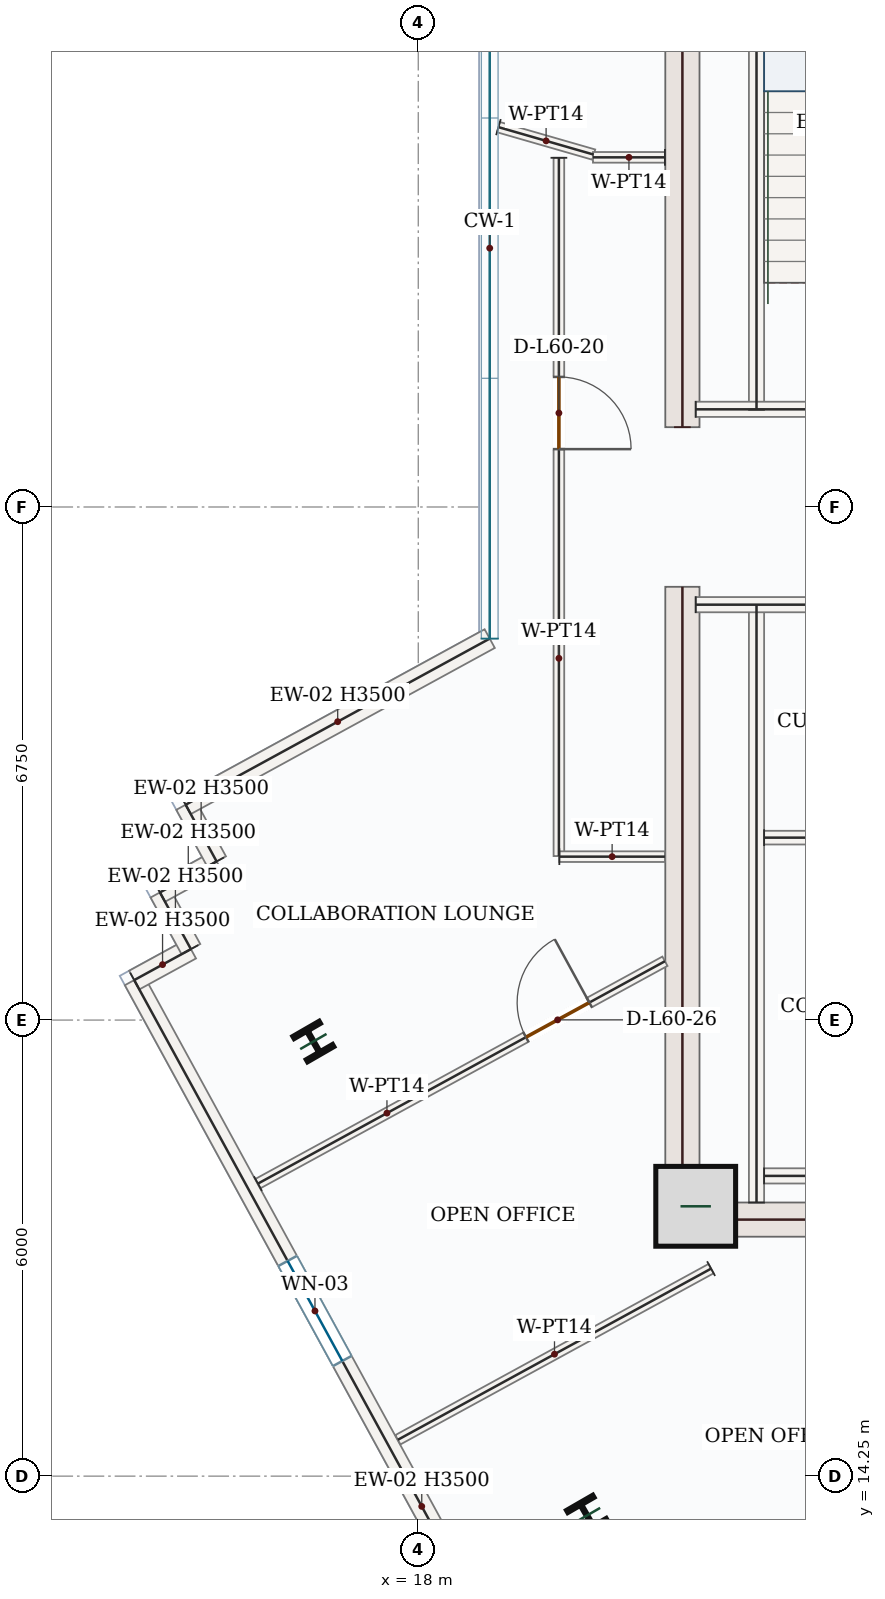
"""IFC4 building model, lengths in metres.
Left out: names, types, materials, properties, quantities, classifications, styles, units other than length and angle.
Written with IfcOpenShell. Run it as: python <this file> out.ifc"""

import sys

from ifc_helpers import new_model, si_unit, direction, frame, frame_2d, origin, origin_2d, place, context, subcontext, project, spatial, rectangle, i_section, extrude, source, transform, mapped, element, fill, save


model = new_model("IFC4")
c1 = context("Model", 3, precision=1e-05, world=origin(), true_north=direction((0.0, 1.0)))
c2 = subcontext(c1, "Body", "Model", "MODEL_VIEW")
j1 = project(units=[si_unit("LENGTHUNIT", "METRE"), si_unit("PLANEANGLEUNIT", "RADIAN")], contexts=[c1])
p1 = place(None, origin())
s1 = spatial("IfcSite", under=j1, at=p1, CompositionType="ELEMENT")
p2 = place(p1, origin())
s2 = spatial("IfcBuilding", under=s1, at=p2, CompositionType="ELEMENT")
p3 = place(p2, frame((0.0, 0.0, 254.1)))
s3 = spatial("IfcBuildingStorey", under=s2, at=p3, CompositionType="ELEMENT", Elevation=254.1)
m1 = source(origin(), c2, "Body", "SweptSolid", [
    extrude(rectangle(XDim=8.55, YDim=0.45, at=frame_2d((4.275, 0.0))), origin(), (0.0, 0.0, 1.0), 3.5),
])
for number, where, z_axis, x_axis in (
    (1, (21.475, 17.4, 0.0), (0.0, 0.0, 1.0), (0.0, 1.0, 0.0)),
    (2, (21.475, 28.05, 0.0), (0.0, 0.0, 1.0), (0.0, 1.0, 0.0)),
):
    element("IfcWall", number, at=place(p3, frame(where, z_axis=z_axis, x_axis=x_axis)), inside=s3, PredefinedType="SHEAR", context=c2, shape_type="MappedRepresentation", body=[
        mapped(m1, transform((0.0, 0.0, 0.0), x_axis=(1.0, 0.0, 0.0), y_axis=(0.0, 1.0, 0.0), z_axis=(0.0, 0.0, 1.0), scale=1.0)),
    ])
m2 = source(origin(), c2, "Body", "SweptSolid", [
    extrude(rectangle(XDim=7.1, YDim=0.45, at=frame_2d((3.55, 0.0))), origin(), (0.0, 0.0, 1.0), 3.5),
])
p4 = place(p3, frame((21.7, 17.625, 0.0), z_axis=(0.0, 0.0, 1.0), x_axis=(1.0, 0.0, 0.0)))
e3 = element("IfcWall", 3, at=p4, inside=s3, PredefinedType="SHEAR", context=c2, shape_type="MappedRepresentation", body=[
    mapped(m2, transform((0.0, 0.0, 0.0), x_axis=(1.0, 0.0, 0.0), y_axis=(0.0, 1.0, 0.0), z_axis=(0.0, 0.0, 1.0), scale=1.0)),
])
m3 = source(origin(), c2, "Body", "SweptSolid", [
    extrude(rectangle(XDim=1.05, YDim=1.05, at=origin_2d()), origin(), (0.0, 0.0, 1.0), 3.75),
])
p5 = place(p3, frame((21.65, 17.8, 0.0), z_axis=(0.0, 0.0, 1.0), x_axis=(1.0, 0.0, 0.0)))
e4 = element("IfcColumn", 4, at=p5, inside=s3, PredefinedType="COLUMN", context=c2, shape_type="MappedRepresentation", body=[
    mapped(m3, transform((0.0, 0.0, 0.0), x_axis=(1.0, 0.0, 0.0), y_axis=(0.0, 1.0, 0.0), z_axis=(0.0, 0.0, 1.0), scale=1.0)),
])
m4 = source(origin(), c2, "Body", "SweptSolid", [
    extrude(i_section(OverallWidth=0.399, OverallDepth=0.386, WebThickness=0.021, FlangeThickness=0.033, FilletRadius=0.018, at=origin_2d()), origin(), (0.0, 0.0, 1.0), 3.75),
])
for number, where, z_axis, x_axis in (
    (5, (16.62, 19.968, 0.0), (0.0, 0.0, 1.0), (0.866, 0.5, 0.0)),
    (6, (20.22, 13.732, 0.0), (0.0, 0.0, 1.0), (0.866, 0.5, 0.0)),
):
    element("IfcColumn", number, at=place(p3, frame(where, z_axis=z_axis, x_axis=x_axis)), inside=s3, PredefinedType="COLUMN", context=c2, shape_type="MappedRepresentation", body=[
        mapped(m4, transform((0.0, 0.0, 0.0), x_axis=(1.0, 0.0, 0.0), y_axis=(0.0, 1.0, 0.0), z_axis=(0.0, 0.0, 1.0), scale=1.0)),
    ])
p6 = place(p3, frame((27.451, 14.74, 0.0), z_axis=(0.0, 0.0, 1.0), x_axis=(-0.877569176667, -0.479450039279, 0.0)))
e7 = element("IfcWall", 7, at=p6, inside=s3, PredefinedType="SOLIDWALL", context=c2, shape_type="SweptSolid", body=[
    extrude(rectangle(XDim=6.979, YDim=0.28, at=frame_2d((3.49, 0.0))), origin(), (0.0, 0.0, 1.0), 3.5),
])
p7 = place(p6, frame((2.74, 0.0, 0.85)))
e8 = element("IfcOpeningElement", 8, at=p7, cuts=e7, PredefinedType="OPENING", context=c2, shape_type="SweptSolid", body=[
    extrude(rectangle(XDim=1.5, YDim=1.5, at=frame_2d((0.75, 0.75))), frame((0.0, 0.15, 0.0), z_axis=(0.0, -1.0, 0.0), x_axis=(1.0, 0.0, 0.0)), (0.0, 0.0, 1.0), 0.3),
])
p8 = place(p3, frame((19.019, 12.071, 0.0), z_axis=(0.0, 0.0, 1.0), x_axis=(-0.479472774144, 0.877556755347, 0.0)))
e9 = element("IfcWall", 9, at=p8, inside=s3, PredefinedType="SOLIDWALL", context=c2, shape_type="SweptSolid", body=[
    extrude(rectangle(XDim=9.92, YDim=0.28, at=frame_2d((4.96, 0.0))), origin(), (0.0, 0.0, 1.0), 3.5),
])
p9 = place(p8, frame((4.21, 0.0, 0.85)))
e10 = element("IfcOpeningElement", 10, at=p9, cuts=e9, PredefinedType="OPENING", context=c2, shape_type="SweptSolid", body=[
    extrude(rectangle(XDim=1.5, YDim=1.5, at=frame_2d((0.75, 0.75))), frame((0.0, 0.15, 0.0), z_axis=(0.0, -1.0, 0.0), x_axis=(1.0, 0.0, 0.0)), (0.0, 0.0, 1.0), 0.3),
])
m5 = source(origin(), c2, "Body", "SweptSolid", [
    extrude(rectangle(XDim=0.85, YDim=0.28, at=frame_2d((0.425, 0.0))), origin(), (0.0, 0.0, 1.0), 3.5),
])
p10 = place(p3, frame((14.263, 20.776, 0.0), z_axis=(0.0, 0.0, 1.0), x_axis=(0.87752219781, 0.479536017782, 0.0)))
e11 = element("IfcWall", 11, at=p10, inside=s3, PredefinedType="SOLIDWALL", context=c2, shape_type="MappedRepresentation", body=[
    mapped(m5, transform((0.0, 0.0, 0.0), x_axis=(1.0, 0.0, 0.0), y_axis=(0.0, 1.0, 0.0), z_axis=(0.0, 0.0, 1.0), scale=1.0)),
])
m6 = source(origin(), c2, "Body", "SweptSolid", [
    extrude(rectangle(XDim=0.85, YDim=0.28, at=frame_2d((0.425, 0.0))), origin(), (0.0, 0.0, 1.0), 3.5),
])
for number, where, z_axis, x_axis in (
    (12, (15.009, 21.184, 0.0), (0.0, 0.0, 1.0), (-0.479, 0.878, 0.0)),
    (13, (14.601, 21.929, 0.0), (0.0, 0.0, 1.0), (0.878, 0.479, 0.0)),
):
    element("IfcWall", number, at=place(p3, frame(where, z_axis=z_axis, x_axis=x_axis)), inside=s3, PredefinedType="SOLIDWALL", context=c2, shape_type="MappedRepresentation", body=[
        mapped(m6, transform((0.0, 0.0, 0.0), x_axis=(1.0, 0.0, 0.0), y_axis=(0.0, 1.0, 0.0), z_axis=(0.0, 0.0, 1.0), scale=1.0)),
    ])
m7 = source(origin(), c2, "Body", "SweptSolid", [
    extrude(rectangle(XDim=0.85, YDim=0.28, at=frame_2d((0.425, 0.0))), origin(), (0.0, 0.0, 1.0), 3.5),
])
p11 = place(p3, frame((15.347, 22.337, 0.0), z_axis=(0.0, 0.0, 1.0), x_axis=(-0.479314855696, 0.877643019177, 0.0)))
e14 = element("IfcWall", 14, at=p11, inside=s3, PredefinedType="SOLIDWALL", context=c2, shape_type="MappedRepresentation", body=[
    mapped(m7, transform((0.0, 0.0, 0.0), x_axis=(1.0, 0.0, 0.0), y_axis=(0.0, 1.0, 0.0), z_axis=(0.0, 0.0, 1.0), scale=1.0)),
])
m8 = source(origin(), c2, "Body", "SweptSolid", [
    extrude(rectangle(XDim=4.558, YDim=0.28, at=frame_2d((2.279, 0.0))), origin(), (0.0, 0.0, 1.0), 3.5),
])
p12 = place(p3, frame((14.94, 23.083, 0.0), z_axis=(0.0, 0.0, 1.0), x_axis=(0.877563774399, 0.479459927276, 0.0)))
e15 = element("IfcWall", 15, at=p12, inside=s3, PredefinedType="SOLIDWALL", context=c2, shape_type="MappedRepresentation", body=[
    mapped(m8, transform((0.0, 0.0, 0.0), x_axis=(1.0, 0.0, 0.0), y_axis=(0.0, 1.0, 0.0), z_axis=(0.0, 0.0, 1.0), scale=1.0)),
])
m9 = source(origin(), c2, "Body", "SweptSolid", [
    extrude(rectangle(XDim=7.87, YDim=0.2, at=frame_2d((3.935, 0.0))), origin(), (0.0, 0.0, 1.0), 3.5),
])
for number, where, z_axis, x_axis in (
    (16, (22.45, 17.85, 0.0), (0.0, 0.0, 1.0), (0.0, 1.0, 0.0)),
    (17, (22.45, 28.28, 0.0), (0.0, 0.0, 1.0), (0.0, 1.0, 0.0)),
):
    element("IfcWall", number, at=place(p3, frame(where, z_axis=z_axis, x_axis=x_axis)), inside=s3, PredefinedType="SOLIDWALL", context=c2, shape_type="MappedRepresentation", body=[
        mapped(m9, transform((0.0, 0.0, 0.0), x_axis=(1.0, 0.0, 0.0), y_axis=(0.0, 1.0, 0.0), z_axis=(0.0, 0.0, 1.0), scale=1.0)),
    ])
m10 = source(origin(), c2, "Body", "SweptSolid", [
    extrude(rectangle(XDim=4.25, YDim=0.2, at=frame_2d((2.125, 0.0))), origin(), (0.0, 0.0, 1.0), 3.5),
])
for number, where, z_axis, x_axis in (
    (18, (21.65, 25.715, 0.0), (0.0, 0.0, 1.0), (1.0, 0.0, 0.0)),
    (19, (21.65, 28.285, 0.0), (0.0, 0.0, 1.0), (1.0, 0.0, 0.0)),
):
    element("IfcWall", number, at=place(p3, frame(where, z_axis=z_axis, x_axis=x_axis)), inside=s3, PredefinedType="SOLIDWALL", context=c2, shape_type="MappedRepresentation", body=[
        mapped(m10, transform((0.0, 0.0, 0.0), x_axis=(1.0, 0.0, 0.0), y_axis=(0.0, 1.0, 0.0), z_axis=(0.0, 0.0, 1.0), scale=1.0)),
    ])
m11 = source(origin(), c2, "Body", "SweptSolid", [
    extrude(rectangle(XDim=3.25, YDim=0.2, at=frame_2d((1.625, 0.0))), origin(), (0.0, 0.0, 1.0), 3.5),
])
p13 = place(p3, frame((22.55, 18.2, 0.0), z_axis=(0.0, 0.0, 1.0), x_axis=(1.0, 0.0, 0.0)))
e20 = element("IfcWall", 20, at=p13, inside=s3, PredefinedType="SOLIDWALL", context=c2, shape_type="MappedRepresentation", body=[
    mapped(m11, transform((0.0, 0.0, 0.0), x_axis=(1.0, 0.0, 0.0), y_axis=(0.0, 1.0, 0.0), z_axis=(0.0, 0.0, 1.0), scale=1.0)),
])
m12 = source(origin(), c2, "Body", "SweptSolid", [
    extrude(rectangle(XDim=3.25, YDim=0.18, at=frame_2d((1.625, 0.0))), origin(), (0.0, 0.0, 1.0), 3.5),
])
p14 = place(p3, frame((22.55, 22.65, 0.0), z_axis=(0.0, 0.0, 1.0), x_axis=(1.0, 0.0, 0.0)))
e21 = element("IfcWall", 21, at=p14, inside=s3, PredefinedType="PARTITIONING", context=c2, shape_type="MappedRepresentation", body=[
    mapped(m12, transform((0.0, 0.0, 0.0), x_axis=(1.0, 0.0, 0.0), y_axis=(0.0, 1.0, 0.0), z_axis=(0.0, 0.0, 1.0), scale=1.0)),
])
m13 = source(origin(), c2, "Body", "SweptSolid", [
    extrude(rectangle(XDim=4.695, YDim=0.14, at=frame_2d((2.348, 0.0))), origin(), (0.0, 0.0, 1.0), 3.5),
])
p15 = place(p3, frame((21.852, 16.98, 0.0), z_axis=(0.0, 0.0, 1.0), x_axis=(-0.877559526902, -0.479467701461, 0.0)))
e22 = element("IfcWall", 22, at=p15, inside=s3, PredefinedType="PARTITIONING", context=c2, shape_type="MappedRepresentation", body=[
    mapped(m13, transform((0.0, 0.0, 0.0), x_axis=(1.0, 0.0, 0.0), y_axis=(0.0, 1.0, 0.0), z_axis=(0.0, 0.0, 1.0), scale=1.0)),
])
p16 = place(p3, frame((15.891, 18.099, 0.0), z_axis=(0.0, 0.0, 1.0), x_axis=(0.877574248726, 0.479440755436, 0.0)))
e23 = element("IfcWall", 23, at=p16, inside=s3, PredefinedType="PARTITIONING", context=c2, shape_type="SweptSolid", body=[
    extrude(rectangle(XDim=6.102, YDim=0.14, at=frame_2d((3.051, 0.0))), origin(), (0.0, 0.0, 1.0), 3.5),
])
p17 = place(p16, frame((4.018, 0.0, 0.0)))
e24 = element("IfcOpeningElement", 24, at=p17, cuts=e23, PredefinedType="OPENING", context=c2, shape_type="SweptSolid", body=[
    extrude(rectangle(XDim=0.95, YDim=2.15, at=frame_2d((0.475, 1.075))), frame((0.0, 0.08, 0.0), z_axis=(0.0, -1.0, 0.0), x_axis=(1.0, 0.0, 0.0)), (0.0, 0.0, 1.0), 0.16),
])
m14 = source(origin(), c2, "Body", "SweptSolid", [
    extrude(rectangle(XDim=1.305, YDim=0.14, at=frame_2d((0.652, 0.0))), origin(), (0.0, 0.0, 1.0), 3.5),
])
p18 = place(p3, frame((19.055, 31.998, 0.0), z_axis=(0.0, 0.0, 1.0), x_axis=(0.960836047515, -0.2771174657, 0.0)))
e25 = element("IfcWall", 25, at=p18, inside=s3, PredefinedType="PARTITIONING", context=c2, shape_type="MappedRepresentation", body=[
    mapped(m14, transform((0.0, 0.0, 0.0), x_axis=(1.0, 0.0, 0.0), y_axis=(0.0, 1.0, 0.0), z_axis=(0.0, 0.0, 1.0), scale=1.0)),
])
p19 = place(p3, frame((19.85, 31.594, 0.0), z_axis=(0.0, 0.0, 1.0), x_axis=(2.657666e-05, -0.999999999647, 0.0)))
e26 = element("IfcWall", 26, at=p19, inside=s3, PredefinedType="PARTITIONING", context=c2, shape_type="SweptSolid", body=[
    extrude(rectangle(XDim=9.186, YDim=0.14, at=frame_2d((4.593, 0.0))), origin(), (0.0, 0.0, 1.0), 3.5),
])
p20 = place(p19, frame((2.883, 0.0, 0.0)))
e27 = element("IfcOpeningElement", 27, at=p20, cuts=e26, PredefinedType="OPENING", context=c2, shape_type="SweptSolid", body=[
    extrude(rectangle(XDim=0.95, YDim=2.15, at=frame_2d((0.475, 1.075))), frame((0.0, 0.08, 0.0), z_axis=(0.0, -1.0, 0.0), x_axis=(1.0, 0.0, 0.0)), (0.0, 0.0, 1.0), 0.16),
])
m15 = source(origin(), c2, "Body", "SweptSolid", [
    extrude(rectangle(XDim=1.389, YDim=0.14, at=frame_2d((0.695, 0.0))), origin(), (0.0, 0.0, 1.0), 3.5),
])
p21 = place(p3, frame((19.856, 22.4, 0.0), z_axis=(0.0, 0.0, 1.0), x_axis=(1.0, 0.0, 0.0)))
e28 = element("IfcWall", 28, at=p21, inside=s3, PredefinedType="PARTITIONING", context=c2, shape_type="MappedRepresentation", body=[
    mapped(m15, transform((0.0, 0.0, 0.0), x_axis=(1.0, 0.0, 0.0), y_axis=(0.0, 1.0, 0.0), z_axis=(0.0, 0.0, 1.0), scale=1.0)),
])
m16 = source(origin(), c2, "Body", "SweptSolid", [
    extrude(rectangle(XDim=0.947, YDim=0.14, at=frame_2d((0.474, 0.0))), origin(), (0.0, 0.0, 1.0), 3.5),
])
p22 = place(p3, frame((21.245, 31.6, 0.0), z_axis=(0.0, 0.0, 1.0), x_axis=(-1.0, 0.0, 0.0)))
e29 = element("IfcWall", 29, at=p22, inside=s3, PredefinedType="PARTITIONING", context=c2, shape_type="MappedRepresentation", body=[
    mapped(m16, transform((0.0, 0.0, 0.0), x_axis=(1.0, 0.0, 0.0), y_axis=(0.0, 1.0, 0.0), z_axis=(0.0, 0.0, 1.0), scale=1.0)),
])
m17 = source(origin(), c2, "Body", "SweptSolid", [
    extrude(rectangle(XDim=1.5, YDim=1.5, at=frame_2d((0.75, 0.75))), frame((0.0, 0.03, 0.0), z_axis=(0.0, -1.0, 0.0), x_axis=(1.0, 0.0, 0.0)), (0.0, 0.0, 1.0), 0.06),
])
p23 = place(p9, origin())
e30 = element("IfcWindow", 30, at=p23, inside=s3, PartitioningType="SINGLE_PANEL", PredefinedType="WINDOW", context=c2, shape_type="MappedRepresentation", body=[
    mapped(m17, transform((0.0, 0.0, 0.0), x_axis=(1.0, 0.0, 0.0), y_axis=(0.0, 1.0, 0.0), z_axis=(0.0, 0.0, 1.0), scale=1.0)),
])
fill(e10, e30)
m18 = source(origin(), c2, "Body", "SweptSolid", [
    extrude(rectangle(XDim=0.95, YDim=2.15, at=frame_2d((0.475, 1.075))), frame((0.0, 0.025, 0.0), z_axis=(0.0, -1.0, 0.0), x_axis=(1.0, 0.0, 0.0)), (0.0, 0.0, 1.0), 0.05),
])
p24 = place(p20, origin())
e31 = element("IfcDoor", 31, at=p24, inside=s3, OperationType="SINGLE_SWING_RIGHT", PredefinedType="DOOR", context=c2, shape_type="MappedRepresentation", body=[
    mapped(m18, transform((0.0, 0.0, 0.0), x_axis=(1.0, 0.0, 0.0), y_axis=(0.0, 1.0, 0.0), z_axis=(0.0, 0.0, 1.0), scale=1.0)),
])
fill(e27, e31)
p25 = place(p17, origin())
e32 = element("IfcDoor", 32, at=p25, inside=s3, OperationType="SINGLE_SWING_RIGHT", PredefinedType="DOOR", context=c2, shape_type="MappedRepresentation", body=[
    mapped(m18, transform((0.0, 0.0, 0.0), x_axis=(1.0, 0.0, 0.0), y_axis=(0.0, 1.0, 0.0), z_axis=(0.0, 0.0, 1.0), scale=1.0)),
])
fill(e24, e32)
save(model, sys.argv[1])
